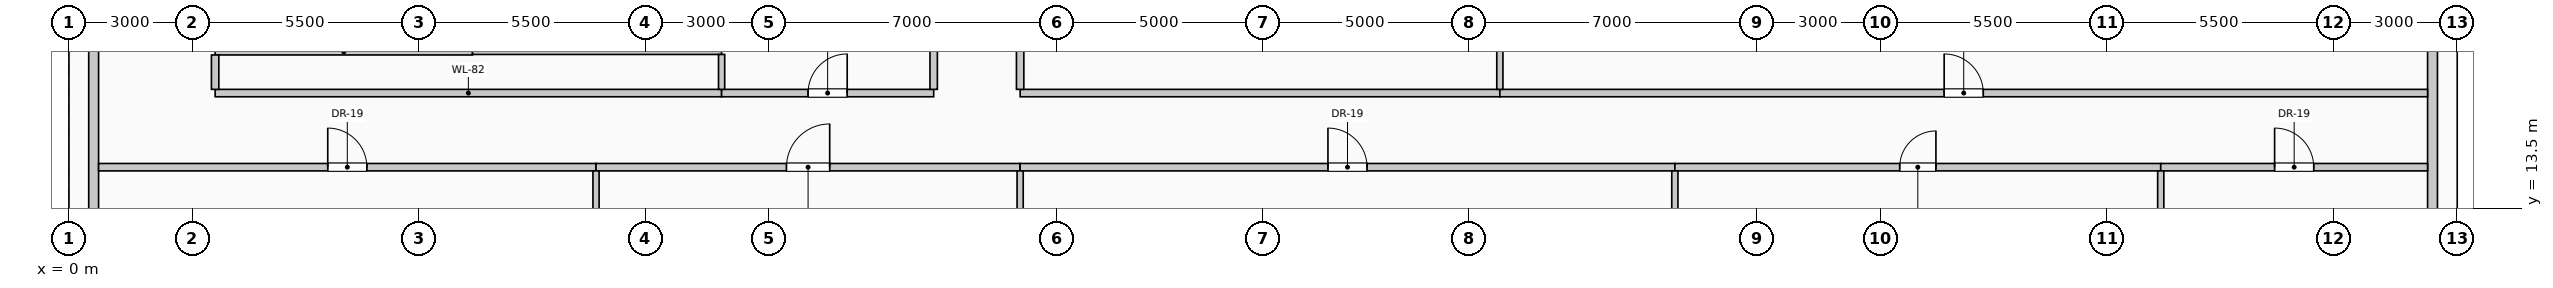
"""IFC4 building model, lengths in metres.
Left out: names, types, materials, properties, quantities, classifications, styles, units other than length and angle.
Written with IfcOpenShell. Run it as: python <this file> out.ifc"""

import sys

from ifc_helpers import new_model, si_unit, direction, frame, frame_2d, origin, place, context, subcontext, project, spatial, rectangle, extrude, element, fill, save


model = new_model("IFC4")
c1 = context("Model", 3, precision=1e-05, world=origin(), true_north=direction((0.0, 1.0)))
c2 = subcontext(c1, "Body", "Model", "MODEL_VIEW")
j1 = project(units=[si_unit("LENGTHUNIT", "METRE"), si_unit("PLANEANGLEUNIT", "RADIAN")], contexts=[c1])
p1 = place(None, origin())
s1 = spatial("IfcSite", under=j1, at=p1, CompositionType="ELEMENT")
p2 = place(p1, origin())
s2 = spatial("IfcBuilding", under=s1, at=p2, CompositionType="ELEMENT")
p3 = place(p2, frame((0.0, 0.0, 218.6)))
s3 = spatial("IfcBuildingStorey", under=s2, at=p3, CompositionType="ELEMENT", Elevation=218.6)
p4 = place(p3, frame((0.6, 10.42, 0.0), z_axis=(0.0, 0.0, 1.0), x_axis=(0.0, 1.0, 0.0)))
e1 = element("IfcWall", 1, at=p4, inside=s3, PredefinedType="SOLIDWALL", context=c2, shape_type="SweptSolid", body=[
    extrude(rectangle(XDim=7.16, YDim=0.24, at=frame_2d((3.58, 0.0))), origin(), (0.0, 0.0, 1.0), 3.0),
])
p5 = place(p4, frame((1.387, 0.0, 0.42)))
e2 = element("IfcOpeningElement", 2, at=p5, cuts=e1, PredefinedType="OPENING", context=c2, shape_type="SweptSolid", body=[
    extrude(rectangle(XDim=1.5, YDim=2.2, at=frame_2d((0.75, 1.1))), frame((0.0, 0.13, 0.0), z_axis=(0.0, -1.0, 0.0), x_axis=(1.0, 0.0, 0.0)), (0.0, 0.0, 1.0), 0.26),
])
p6 = place(p3, frame((57.4, 17.58, 0.0), z_axis=(0.0, 0.0, 1.0), x_axis=(0.0, -1.0, 0.0)))
e3 = element("IfcWall", 3, at=p6, inside=s3, PredefinedType="SOLIDWALL", context=c2, shape_type="SweptSolid", body=[
    extrude(rectangle(XDim=7.16, YDim=0.24, at=frame_2d((3.58, 0.0))), origin(), (0.0, 0.0, 1.0), 3.0),
])
p7 = place(p6, frame((4.273, 0.0, 0.42)))
e4 = element("IfcOpeningElement", 4, at=p7, cuts=e3, PredefinedType="OPENING", context=c2, shape_type="SweptSolid", body=[
    extrude(rectangle(XDim=1.5, YDim=2.2, at=frame_2d((0.75, 1.1))), frame((0.0, 0.13, 0.0), z_axis=(0.0, -1.0, 0.0), x_axis=(1.0, 0.0, 0.0)), (0.0, 0.0, 1.0), 0.26),
])
p8 = place(p3, frame((0.72, 14.5, 0.0), z_axis=(0.0, 0.0, 1.0), x_axis=(1.0, 0.0, 0.0)))
e5 = element("IfcWall", 5, at=p8, inside=s3, PredefinedType="PARTITIONING", context=c2, shape_type="SweptSolid", body=[
    extrude(rectangle(XDim=12.08, YDim=0.18, at=frame_2d((6.04, 0.0))), origin(), (0.0, 0.0, 1.0), 3.75),
])
p9 = place(p8, frame((5.565, 0.0, 0.0)))
e6 = element("IfcOpeningElement", 6, at=p9, cuts=e5, PredefinedType="OPENING", context=c2, shape_type="SweptSolid", body=[
    extrude(rectangle(XDim=0.95, YDim=2.15, at=frame_2d((0.475, 1.075))), frame((0.0, 0.1, 0.0), z_axis=(0.0, -1.0, 0.0), x_axis=(1.0, 0.0, 0.0)), (0.0, 0.0, 1.0), 0.2),
])
p10 = place(p3, frame((12.8, 14.5, 0.0), z_axis=(0.0, 0.0, 1.0), x_axis=(1.0, 0.0, 0.0)))
e7 = element("IfcWall", 7, at=p10, inside=s3, PredefinedType="PARTITIONING", context=c2, shape_type="SweptSolid", body=[
    extrude(rectangle(XDim=10.3, YDim=0.18, at=frame_2d((5.15, 0.0))), origin(), (0.0, 0.0, 1.0), 3.75),
])
p11 = place(p10, frame((4.625, 0.0, 0.0)))
e8 = element("IfcOpeningElement", 8, at=p11, cuts=e7, PredefinedType="OPENING", context=c2, shape_type="SweptSolid", body=[
    extrude(rectangle(XDim=1.05, YDim=2.15, at=frame_2d((0.525, 1.075))), frame((0.0, 0.1, 0.0), z_axis=(0.0, -1.0, 0.0), x_axis=(1.0, 0.0, 0.0)), (0.0, 0.0, 1.0), 0.2),
])
p12 = place(p3, frame((23.1, 14.5, 0.0), z_axis=(0.0, 0.0, 1.0), x_axis=(1.0, 0.0, 0.0)))
e9 = element("IfcWall", 9, at=p12, inside=s3, PredefinedType="PARTITIONING", context=c2, shape_type="SweptSolid", body=[
    extrude(rectangle(XDim=15.9, YDim=0.18, at=frame_2d((7.95, 0.0))), origin(), (0.0, 0.0, 1.0), 3.75),
])
p13 = place(p12, frame((7.475, 0.0, 0.0)))
e10 = element("IfcOpeningElement", 10, at=p13, cuts=e9, PredefinedType="OPENING", context=c2, shape_type="SweptSolid", body=[
    extrude(rectangle(XDim=0.95, YDim=2.15, at=frame_2d((0.475, 1.075))), frame((0.0, 0.1, 0.0), z_axis=(0.0, -1.0, 0.0), x_axis=(1.0, 0.0, 0.0)), (0.0, 0.0, 1.0), 0.2),
])
p14 = place(p3, frame((39.0, 14.5, 0.0), z_axis=(0.0, 0.0, 1.0), x_axis=(1.0, 0.0, 0.0)))
e11 = element("IfcWall", 11, at=p14, inside=s3, PredefinedType="PARTITIONING", context=c2, shape_type="SweptSolid", body=[
    extrude(rectangle(XDim=11.8, YDim=0.18, at=frame_2d((5.9, 0.0))), origin(), (0.0, 0.0, 1.0), 3.75),
])
p15 = place(p14, frame((5.46, 0.0, 0.0)))
e12 = element("IfcOpeningElement", 12, at=p15, cuts=e11, PredefinedType="OPENING", context=c2, shape_type="SweptSolid", body=[
    extrude(rectangle(XDim=0.88, YDim=2.1, at=frame_2d((0.44, 1.05))), frame((0.0, 0.1, 0.0), z_axis=(0.0, -1.0, 0.0), x_axis=(1.0, 0.0, 0.0)), (0.0, 0.0, 1.0), 0.2),
])
p16 = place(p3, frame((50.8, 14.5, 0.0), z_axis=(0.0, 0.0, 1.0), x_axis=(1.0, 0.0, 0.0)))
e13 = element("IfcWall", 13, at=p16, inside=s3, PredefinedType="PARTITIONING", context=c2, shape_type="SweptSolid", body=[
    extrude(rectangle(XDim=6.48, YDim=0.18, at=frame_2d((3.24, 0.0))), origin(), (0.0, 0.0, 1.0), 3.75),
])
p17 = place(p16, frame((2.765, 0.0, 0.0)))
e14 = element("IfcOpeningElement", 14, at=p17, cuts=e13, PredefinedType="OPENING", context=c2, shape_type="SweptSolid", body=[
    extrude(rectangle(XDim=0.95, YDim=2.15, at=frame_2d((0.475, 1.075))), frame((0.0, 0.1, 0.0), z_axis=(0.0, -1.0, 0.0), x_axis=(1.0, 0.0, 0.0)), (0.0, 0.0, 1.0), 0.2),
])
p18 = place(p3, frame((3.55, 16.3, 0.0), z_axis=(0.0, 0.0, 1.0), x_axis=(1.0, 0.0, 0.0)))
e15 = element("IfcWall", 15, at=p18, inside=s3, PredefinedType="PARTITIONING", context=c2, shape_type="SweptSolid", body=[
    extrude(rectangle(XDim=12.3, YDim=0.18, at=frame_2d((6.15, 0.0))), origin(), (0.0, 0.0, 1.0), 3.75),
])
p19 = place(p3, frame((15.85, 16.3, 0.0), z_axis=(0.0, 0.0, 1.0), x_axis=(1.0, 0.0, 0.0)))
e16 = element("IfcWall", 16, at=p19, inside=s3, PredefinedType="PARTITIONING", context=c2, shape_type="SweptSolid", body=[
    extrude(rectangle(XDim=5.15, YDim=0.18, at=frame_2d((2.575, 0.0))), origin(), (0.0, 0.0, 1.0), 3.75),
])
p20 = place(p19, frame((2.1, 0.0, 0.0)))
e17 = element("IfcOpeningElement", 17, at=p20, cuts=e16, PredefinedType="OPENING", context=c2, shape_type="SweptSolid", body=[
    extrude(rectangle(XDim=0.95, YDim=2.15, at=frame_2d((0.475, 1.075))), frame((0.0, 0.1, 0.0), z_axis=(0.0, -1.0, 0.0), x_axis=(1.0, 0.0, 0.0)), (0.0, 0.0, 1.0), 0.2),
])
p21 = place(p3, frame((23.1, 16.3, 0.0), z_axis=(0.0, 0.0, 1.0), x_axis=(1.0, 0.0, 0.0)))
e18 = element("IfcWall", 18, at=p21, inside=s3, PredefinedType="PARTITIONING", context=c2, shape_type="SweptSolid", body=[
    extrude(rectangle(XDim=11.65, YDim=0.18, at=frame_2d((5.825, 0.0))), origin(), (0.0, 0.0, 1.0), 3.75),
])
p22 = place(p3, frame((34.75, 16.3, 0.0), z_axis=(0.0, 0.0, 1.0), x_axis=(1.0, 0.0, 0.0)))
e19 = element("IfcWall", 19, at=p22, inside=s3, PredefinedType="PARTITIONING", context=c2, shape_type="SweptSolid", body=[
    extrude(rectangle(XDim=22.53, YDim=0.18, at=frame_2d((11.265, 0.0))), origin(), (0.0, 0.0, 1.0), 3.75),
])
p23 = place(p22, frame((10.79, 0.0, 0.0)))
e20 = element("IfcOpeningElement", 20, at=p23, cuts=e19, PredefinedType="OPENING", context=c2, shape_type="SweptSolid", body=[
    extrude(rectangle(XDim=0.95, YDim=2.15, at=frame_2d((0.475, 1.075))), frame((0.0, 0.1, 0.0), z_axis=(0.0, -1.0, 0.0), x_axis=(1.0, 0.0, 0.0)), (0.0, 0.0, 1.0), 0.2),
])
p24 = place(p3, frame((3.55, 17.3, 0.0), z_axis=(0.0, 0.0, 1.0), x_axis=(1.0, 0.0, 0.0)))
e21 = element("IfcWall", 21, at=p24, inside=s3, PredefinedType="PARTITIONING", context=c2, shape_type="SweptSolid", body=[
    extrude(rectangle(XDim=6.25, YDim=0.15, at=frame_2d((3.125, 0.0))), origin(), (0.0, 0.0, 1.0), 3.75),
])
p25 = place(p3, frame((9.8, 17.3, 0.0), z_axis=(0.0, 0.0, 1.0), x_axis=(1.0, 0.0, 0.0)))
e22 = element("IfcWall", 22, at=p25, inside=s3, PredefinedType="PARTITIONING", context=c2, shape_type="SweptSolid", body=[
    extrude(rectangle(XDim=6.05, YDim=0.125, at=frame_2d((3.025, 0.0))), origin(), (0.0, 0.0, 1.0), 3.75),
])
p26 = place(p3, frame((3.55, 16.39, 0.0), z_axis=(0.0, 0.0, 1.0), x_axis=(0.0, 1.0, 0.0)))
e23 = element("IfcWall", 23, at=p26, inside=s3, PredefinedType="PARTITIONING", context=c2, shape_type="SweptSolid", body=[
    extrude(rectangle(XDim=0.835, YDim=0.18, at=frame_2d((0.417, 0.0))), origin(), (0.0, 0.0, 1.0), 3.75),
])
p27 = place(p3, frame((12.8, 0.72, 0.0), z_axis=(0.0, 0.0, 1.0), x_axis=(0.0, 1.0, 0.0)))
e24 = element("IfcWall", 24, at=p27, inside=s3, PredefinedType="PARTITIONING", context=c2, shape_type="SweptSolid", body=[
    extrude(rectangle(XDim=13.69, YDim=0.15, at=frame_2d((6.845, 0.0))), origin(), (0.0, 0.0, 1.0), 3.75),
])
p28 = place(p3, frame((15.85, 16.39, 0.0), z_axis=(0.0, 0.0, 1.0), x_axis=(0.0, 1.0, 0.0)))
e25 = element("IfcWall", 25, at=p28, inside=s3, PredefinedType="PARTITIONING", context=c2, shape_type="SweptSolid", body=[
    extrude(rectangle(XDim=0.848, YDim=0.15, at=frame_2d((0.424, 0.0))), origin(), (0.0, 0.0, 1.0), 3.75),
])
p29 = place(p3, frame((21.0, 16.39, 0.0), z_axis=(0.0, 0.0, 1.0), x_axis=(0.0, 1.0, 0.0)))
e26 = element("IfcWall", 26, at=p29, inside=s3, PredefinedType="PARTITIONING", context=c2, shape_type="SweptSolid", body=[
    extrude(rectangle(XDim=8.335, YDim=0.18, at=frame_2d((4.167, 0.0))), origin(), (0.0, 0.0, 1.0), 3.75),
])
p30 = place(p3, frame((23.1, 0.72, 0.0), z_axis=(0.0, 0.0, 1.0), x_axis=(0.0, 1.0, 0.0)))
e27 = element("IfcWall", 27, at=p30, inside=s3, PredefinedType="PARTITIONING", context=c2, shape_type="SweptSolid", body=[
    extrude(rectangle(XDim=13.69, YDim=0.15, at=frame_2d((6.845, 0.0))), origin(), (0.0, 0.0, 1.0), 3.75),
])
p31 = place(p3, frame((23.1, 16.39, 0.0), z_axis=(0.0, 0.0, 1.0), x_axis=(0.0, 1.0, 0.0)))
e28 = element("IfcWall", 28, at=p31, inside=s3, PredefinedType="PARTITIONING", context=c2, shape_type="SweptSolid", body=[
    extrude(rectangle(XDim=3.185, YDim=0.18, at=frame_2d((1.593, 0.0))), origin(), (0.0, 0.0, 1.0), 3.75),
])
p32 = place(p3, frame((34.75, 16.39, 0.0), z_axis=(0.0, 0.0, 1.0), x_axis=(0.0, 1.0, 0.0)))
e29 = element("IfcWall", 29, at=p32, inside=s3, PredefinedType="PARTITIONING", context=c2, shape_type="SweptSolid", body=[
    extrude(rectangle(XDim=3.185, YDim=0.15, at=frame_2d((1.593, 0.0))), origin(), (0.0, 0.0, 1.0), 3.75),
])
for number, where, z_axis, x_axis in (
    (30, (39.0, 0.72, 0.0), (0.0, 0.0, 1.0), (0.0, 1.0, 0.0)),
    (31, (50.8, 0.72, 0.0), (0.0, 0.0, 1.0), (0.0, 1.0, 0.0)),
):
    element("IfcWall", number, at=place(p3, frame(where, z_axis=z_axis, x_axis=x_axis)), inside=s3, PredefinedType="PARTITIONING", context=c2, shape_type="SweptSolid", body=[
        extrude(rectangle(XDim=13.69, YDim=0.15, at=frame_2d((6.845, 0.0))), origin(), (0.0, 0.0, 1.0), 3.75),
    ])
p33 = place(p9, origin())
e32 = element("IfcDoor", 32, at=p33, inside=s3, OperationType="SINGLE_SWING_LEFT", PredefinedType="DOOR", context=c2, shape_type="SweptSolid", body=[
    extrude(rectangle(XDim=0.95, YDim=2.15, at=frame_2d((0.475, 1.075))), frame((0.0, 0.025, 0.0), z_axis=(0.0, -1.0, 0.0), x_axis=(1.0, 0.0, 0.0)), (0.0, 0.0, 1.0), 0.05),
])
fill(e6, e32)
p34 = place(p11, origin())
e33 = element("IfcDoor", 33, at=p34, inside=s3, OperationType="SINGLE_SWING_RIGHT", PredefinedType="DOOR", context=c2, shape_type="SweptSolid", body=[
    extrude(rectangle(XDim=1.05, YDim=2.15, at=frame_2d((0.525, 1.075))), frame((0.0, 0.025, 0.0), z_axis=(0.0, -1.0, 0.0), x_axis=(1.0, 0.0, 0.0)), (0.0, 0.0, 1.0), 0.05),
])
fill(e8, e33)
p35 = place(p13, origin())
e34 = element("IfcDoor", 34, at=p35, inside=s3, OperationType="SINGLE_SWING_LEFT", PredefinedType="DOOR", context=c2, shape_type="SweptSolid", body=[
    extrude(rectangle(XDim=0.95, YDim=2.15, at=frame_2d((0.475, 1.075))), frame((0.0, 0.025, 0.0), z_axis=(0.0, -1.0, 0.0), x_axis=(1.0, 0.0, 0.0)), (0.0, 0.0, 1.0), 0.05),
])
fill(e10, e34)
p36 = place(p15, origin())
e35 = element("IfcDoor", 35, at=p36, inside=s3, OperationType="SINGLE_SWING_RIGHT", PredefinedType="DOOR", context=c2, shape_type="SweptSolid", body=[
    extrude(rectangle(XDim=0.88, YDim=2.1, at=frame_2d((0.44, 1.05))), frame((0.0, 0.025, 0.0), z_axis=(0.0, -1.0, 0.0), x_axis=(1.0, 0.0, 0.0)), (0.0, 0.0, 1.0), 0.05),
])
fill(e12, e35)
p37 = place(p17, origin())
e36 = element("IfcDoor", 36, at=p37, inside=s3, OperationType="SINGLE_SWING_LEFT", PredefinedType="DOOR", context=c2, shape_type="SweptSolid", body=[
    extrude(rectangle(XDim=0.95, YDim=2.15, at=frame_2d((0.475, 1.075))), frame((0.0, 0.025, 0.0), z_axis=(0.0, -1.0, 0.0), x_axis=(1.0, 0.0, 0.0)), (0.0, 0.0, 1.0), 0.05),
])
fill(e14, e36)
p38 = place(p20, origin())
e37 = element("IfcDoor", 37, at=p38, inside=s3, OperationType="SINGLE_SWING_RIGHT", PredefinedType="DOOR", context=c2, shape_type="SweptSolid", body=[
    extrude(rectangle(XDim=0.95, YDim=2.15, at=frame_2d((0.475, 1.075))), frame((0.0, 0.025, 0.0), z_axis=(0.0, -1.0, 0.0), x_axis=(1.0, 0.0, 0.0)), (0.0, 0.0, 1.0), 0.05),
])
fill(e17, e37)
p39 = place(p23, origin())
e38 = element("IfcDoor", 38, at=p39, inside=s3, OperationType="SINGLE_SWING_LEFT", PredefinedType="DOOR", context=c2, shape_type="SweptSolid", body=[
    extrude(rectangle(XDim=0.95, YDim=2.15, at=frame_2d((0.475, 1.075))), frame((0.0, 0.025, 0.0), z_axis=(0.0, -1.0, 0.0), x_axis=(1.0, 0.0, 0.0)), (0.0, 0.0, 1.0), 0.05),
])
fill(e20, e38)
save(model, sys.argv[1])
